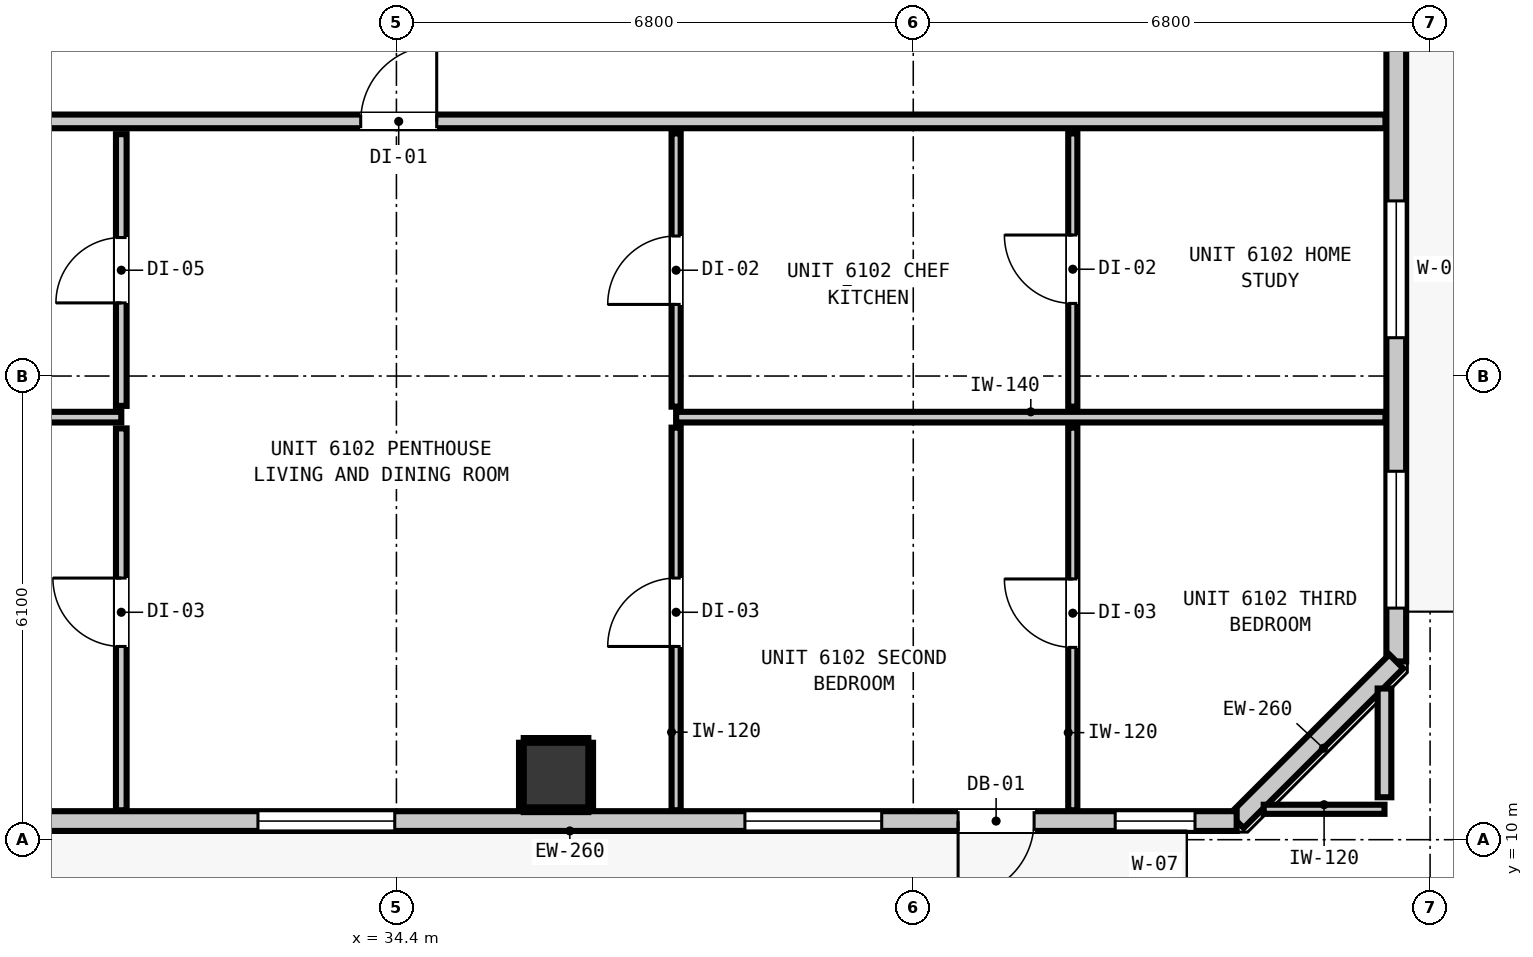
"""IFC4 building model, lengths in metres.
Left out: names, types, materials, properties, quantities, classifications, styles, units other than length and angle.
Written with IfcOpenShell. Run it as: python <this file> out.ifc"""

import sys

from ifc_helpers import new_model, si_unit, direction, frame, frame_2d, origin, origin_2d, place, context, subcontext, project, spatial, rectangle, extrude, element, fill, save


model = new_model("IFC4")
c1 = context("Model", 3, precision=1e-05, world=origin(), true_north=direction((0.0, 1.0)))
c2 = subcontext(c1, "Body", "Model", "MODEL_VIEW")
j1 = project(units=[si_unit("LENGTHUNIT", "METRE"), si_unit("PLANEANGLEUNIT", "RADIAN")], contexts=[c1])
p1 = place(None, origin())
s1 = spatial("IfcSite", under=j1, at=p1, CompositionType="ELEMENT")
p2 = place(p1, origin())
s2 = spatial("IfcBuilding", under=s1, at=p2, CompositionType="ELEMENT")
p3 = place(p2, frame((0.0, 0.0, 210.08)))
s3 = spatial("IfcBuildingStorey", under=s2, at=p3, CompositionType="ELEMENT", Elevation=210.08)
p4 = place(p3, frame((36.5, 10.85, -0.2), z_axis=(0.0, 0.0, 1.0), x_axis=(1.0, 0.0, 0.0)))
e1 = element("IfcColumn", 1, at=p4, inside=s3, PredefinedType="COLUMN", context=c2, shape_type="SweptSolid", body=[
    extrude(rectangle(XDim=0.85, YDim=0.85, at=origin_2d()), origin(), (0.0, 0.0, 1.0), 3.52),
])
p5 = place(p3, frame((47.555, 42.655, 0.0), z_axis=(0.0, 0.0, 1.0), x_axis=(0.0, -1.0, 0.0)))
e2 = element("IfcWall", 2, at=p5, inside=s3, PredefinedType="STANDARD", context=c2, shape_type="SweptSolid", body=[
    extrude(rectangle(XDim=30.31, YDim=0.26, at=frame_2d((15.155, 0.0))), origin(), (0.0, 0.0, 1.0), 3.1),
])
p6 = place(p5, frame((4.082, 0.0, 0.0)))
e3 = element("IfcOpeningElement", 3, at=p6, cuts=e2, PredefinedType="OPENING", context=c2, shape_type="SweptSolid", body=[
    extrude(rectangle(XDim=1.0, YDim=2.15, at=frame_2d((0.5, 1.075))), frame((0.0, 0.14, 0.0), z_axis=(0.0, -1.0, 0.0), x_axis=(1.0, 0.0, 0.0)), (0.0, 0.0, 1.0), 0.28),
])
p7 = place(p5, frame((24.251, 0.0, 0.85)))
e4 = element("IfcOpeningElement", 4, at=p7, cuts=e2, PredefinedType="OPENING", context=c2, shape_type="SweptSolid", body=[
    extrude(rectangle(XDim=1.8, YDim=1.9, at=frame_2d((0.9, 0.95))), frame((0.0, 0.14, 0.0), z_axis=(0.0, -1.0, 0.0), x_axis=(1.0, 0.0, 0.0)), (0.0, 0.0, 1.0), 0.28),
])
p8 = place(p5, frame((27.808, 0.0, 0.85)))
e5 = element("IfcOpeningElement", 5, at=p8, cuts=e2, PredefinedType="OPENING", context=c2, shape_type="SweptSolid", body=[
    extrude(rectangle(XDim=1.8, YDim=1.9, at=frame_2d((0.9, 0.95))), frame((0.0, 0.14, 0.0), z_axis=(0.0, -1.0, 0.0), x_axis=(1.0, 0.0, 0.0)), (0.0, 0.0, 1.0), 0.28),
])
p9 = place(p3, frame((47.555, 12.345, 0.0), z_axis=(0.0, 0.0, 1.0), x_axis=(-0.707106781187, -0.707106781187, 0.0)))
e6 = element("IfcWall", 6, at=p9, inside=s3, PredefinedType="STANDARD", context=c2, shape_type="SweptSolid", body=[
    extrude(rectangle(XDim=2.97, YDim=0.26, at=frame_2d((1.485, 0.0))), origin(), (0.0, 0.0, 1.0), 3.1),
])
p10 = place(p3, frame((45.455, 10.245, 0.0), z_axis=(0.0, 0.0, 1.0), x_axis=(-1.0, 0.0, 0.0)))
e7 = element("IfcWall", 7, at=p10, inside=s3, PredefinedType="STANDARD", context=c2, shape_type="SweptSolid", body=[
    extrude(rectangle(XDim=32.71, YDim=0.26, at=frame_2d((16.355, 0.0))), origin(), (0.0, 0.0, 1.0), 3.1),
])
p11 = place(p10, frame((2.665, 0.0, 0.0)))
e8 = element("IfcOpeningElement", 8, at=p11, cuts=e7, PredefinedType="OPENING", context=c2, shape_type="SweptSolid", body=[
    extrude(rectangle(XDim=1.0, YDim=2.15, at=frame_2d((0.5, 1.075))), frame((0.0, 0.14, 0.0), z_axis=(0.0, -1.0, 0.0), x_axis=(1.0, 0.0, 0.0)), (0.0, 0.0, 1.0), 0.28),
])
p12 = place(p10, frame((26.731, 0.0, 0.85)))
e9 = element("IfcOpeningElement", 9, at=p12, cuts=e7, PredefinedType="OPENING", context=c2, shape_type="SweptSolid", body=[
    extrude(rectangle(XDim=1.8, YDim=1.9, at=frame_2d((0.9, 0.95))), frame((0.0, 0.14, 0.0), z_axis=(0.0, -1.0, 0.0), x_axis=(1.0, 0.0, 0.0)), (0.0, 0.0, 1.0), 0.28),
])
p13 = place(p10, frame((30.556, 0.0, 0.85)))
e10 = element("IfcOpeningElement", 10, at=p13, cuts=e7, PredefinedType="OPENING", context=c2, shape_type="SweptSolid", body=[
    extrude(rectangle(XDim=0.9, YDim=1.5, at=frame_2d((0.45, 0.75))), frame((0.0, 0.14, 0.0), z_axis=(0.0, -1.0, 0.0), x_axis=(1.0, 0.0, 0.0)), (0.0, 0.0, 1.0), 0.28),
])
p14 = place(p10, frame((20.676, 0.0, 0.85)))
e11 = element("IfcOpeningElement", 11, at=p14, cuts=e7, PredefinedType="OPENING", context=c2, shape_type="SweptSolid", body=[
    extrude(rectangle(XDim=1.8, YDim=1.9, at=frame_2d((0.9, 0.95))), frame((0.0, 0.14, 0.0), z_axis=(0.0, -1.0, 0.0), x_axis=(1.0, 0.0, 0.0)), (0.0, 0.0, 1.0), 0.28),
])
p15 = place(p10, frame((11.077, 0.0, 0.85)))
e12 = element("IfcOpeningElement", 12, at=p15, cuts=e7, PredefinedType="OPENING", context=c2, shape_type="SweptSolid", body=[
    extrude(rectangle(XDim=1.8, YDim=1.9, at=frame_2d((0.9, 0.95))), frame((0.0, 0.14, 0.0), z_axis=(0.0, -1.0, 0.0), x_axis=(1.0, 0.0, 0.0)), (0.0, 0.0, 1.0), 0.28),
])
p16 = place(p10, frame((17.428, 0.0, 0.85)))
e13 = element("IfcOpeningElement", 13, at=p16, cuts=e7, PredefinedType="OPENING", context=c2, shape_type="SweptSolid", body=[
    extrude(rectangle(XDim=1.8, YDim=1.9, at=frame_2d((0.9, 0.95))), frame((0.0, 0.14, 0.0), z_axis=(0.0, -1.0, 0.0), x_axis=(1.0, 0.0, 0.0)), (0.0, 0.0, 1.0), 0.28),
])
p17 = place(p10, frame((4.67, 0.0, 0.85)))
e14 = element("IfcOpeningElement", 14, at=p17, cuts=e7, PredefinedType="OPENING", context=c2, shape_type="SweptSolid", body=[
    extrude(rectangle(XDim=1.8, YDim=1.9, at=frame_2d((0.9, 0.95))), frame((0.0, 0.14, 0.0), z_axis=(0.0, -1.0, 0.0), x_axis=(1.0, 0.0, 0.0)), (0.0, 0.0, 1.0), 0.28),
])
p18 = place(p10, frame((0.548, 0.0, 0.85)))
e15 = element("IfcOpeningElement", 15, at=p18, cuts=e7, PredefinedType="OPENING", context=c2, shape_type="SweptSolid", body=[
    extrude(rectangle(XDim=1.05, YDim=1.65, at=frame_2d((0.525, 0.825))), frame((0.0, 0.14, 0.0), z_axis=(0.0, -1.0, 0.0), x_axis=(1.0, 0.0, 0.0)), (0.0, 0.0, 1.0), 0.28),
])
p19 = place(p3, frame((10.787, 19.45, 0.0), z_axis=(0.0, 0.0, 1.0), x_axis=(1.0, 0.0, 0.0)))
e16 = element("IfcWall", 16, at=p19, inside=s3, PredefinedType="PARTITIONING", context=c2, shape_type="SweptSolid", body=[
    extrude(rectangle(XDim=36.626, YDim=0.18, at=frame_2d((18.313, 0.0))), origin(), (0.0, 0.0, 1.0), 3.1),
])
p20 = place(p19, frame((7.49, 0.0, 0.0)))
e17 = element("IfcOpeningElement", 17, at=p20, cuts=e16, PredefinedType="OPENING", context=c2, shape_type="SweptSolid", body=[
    extrude(rectangle(XDim=1.0, YDim=2.15, at=frame_2d((0.5, 1.075))), frame((0.0, 0.1, 0.0), z_axis=(0.0, -1.0, 0.0), x_axis=(1.0, 0.0, 0.0)), (0.0, 0.0, 1.0), 0.2),
])
p21 = place(p19, frame((23.143, 0.0, 0.0)))
e18 = element("IfcOpeningElement", 18, at=p21, cuts=e16, PredefinedType="OPENING", context=c2, shape_type="SweptSolid", body=[
    extrude(rectangle(XDim=1.0, YDim=2.15, at=frame_2d((0.5, 1.075))), frame((0.0, 0.1, 0.0), z_axis=(0.0, -1.0, 0.0), x_axis=(1.0, 0.0, 0.0)), (0.0, 0.0, 1.0), 0.2),
])
p22 = place(p3, frame((22.38, 15.559, 0.0), z_axis=(0.0, 0.0, 1.0), x_axis=(1.0, 0.0, 0.0)))
e19 = element("IfcWall", 19, at=p22, inside=s3, PredefinedType="PARTITIONING", context=c2, shape_type="SweptSolid", body=[
    extrude(rectangle(XDim=8.4, YDim=0.14, at=frame_2d((4.2, 0.0))), origin(), (0.0, 0.0, 1.0), 3.1),
])
p23 = place(p3, frame((38.08, 15.559, 0.0), z_axis=(0.0, 0.0, 1.0), x_axis=(1.0, 0.0, 0.0)))
e20 = element("IfcWall", 20, at=p23, inside=s3, PredefinedType="PARTITIONING", context=c2, shape_type="SweptSolid", body=[
    extrude(rectangle(XDim=9.333, YDim=0.14, at=frame_2d((4.667, 0.0))), origin(), (0.0, 0.0, 1.0), 3.1),
])
p24 = place(p3, frame((45.811, 10.4, 0.0), z_axis=(0.0, 0.0, 1.0), x_axis=(1.0, 0.0, 0.0)))
e21 = element("IfcWall", 21, at=p24, inside=s3, PredefinedType="PARTITIONING", context=c2, shape_type="SweptSolid", body=[
    extrude(rectangle(XDim=1.589, YDim=0.12, at=frame_2d((0.794, 0.0))), origin(), (0.0, 0.0, 1.0), 3.1),
])
p25 = place(p3, frame((47.4, 10.558, 0.0), z_axis=(0.0, 0.0, 1.0), x_axis=(0.0, 1.0, 0.0)))
e22 = element("IfcWall", 22, at=p25, inside=s3, PredefinedType="PARTITIONING", context=c2, shape_type="SweptSolid", body=[
    extrude(rectangle(XDim=1.431, YDim=0.18, at=frame_2d((0.715, 0.0))), origin(), (0.0, 0.0, 1.0), 3.1),
])
p26 = place(p3, frame((30.78, 10.387, 0.0), z_axis=(0.0, 0.0, 1.0), x_axis=(0.0, 1.0, 0.0)))
e23 = element("IfcWall", 23, at=p26, inside=s3, PredefinedType="PARTITIONING", context=c2, shape_type="SweptSolid", body=[
    extrude(rectangle(XDim=5.024, YDim=0.14, at=frame_2d((2.512, 0.0))), origin(), (0.0, 0.0, 1.0), 3.1),
])
p27 = place(p26, frame((2.155, 0.0, 0.0)))
e24 = element("IfcOpeningElement", 24, at=p27, cuts=e23, PredefinedType="OPENING", context=c2, shape_type="SweptSolid", body=[
    extrude(rectangle(XDim=0.9, YDim=2.1, at=frame_2d((0.45, 1.05))), frame((0.0, 0.08, 0.0), z_axis=(0.0, -1.0, 0.0), x_axis=(1.0, 0.0, 0.0)), (0.0, 0.0, 1.0), 0.16),
])
p28 = place(p3, frame((30.78, 15.707, 0.0), z_axis=(0.0, 0.0, 1.0), x_axis=(0.0, 1.0, 0.0)))
e25 = element("IfcWall", 25, at=p28, inside=s3, PredefinedType="PARTITIONING", context=c2, shape_type="SweptSolid", body=[
    extrude(rectangle(XDim=3.575, YDim=0.14, at=frame_2d((1.788, 0.0))), origin(), (0.0, 0.0, 1.0), 3.1),
])
p29 = place(p28, frame((1.355, 0.0, 0.0)))
e26 = element("IfcOpeningElement", 26, at=p29, cuts=e25, PredefinedType="OPENING", context=c2, shape_type="SweptSolid", body=[
    extrude(rectangle(XDim=0.86, YDim=2.02, at=frame_2d((0.43, 1.01))), frame((0.0, 0.08, 0.0), z_axis=(0.0, -1.0, 0.0), x_axis=(1.0, 0.0, 0.0)), (0.0, 0.0, 1.0), 0.16),
])
p30 = place(p3, frame((38.08, 10.387, 0.0), z_axis=(0.0, 0.0, 1.0), x_axis=(0.0, 1.0, 0.0)))
e27 = element("IfcWall", 27, at=p30, inside=s3, PredefinedType="PARTITIONING", context=c2, shape_type="SweptSolid", body=[
    extrude(rectangle(XDim=5.034, YDim=0.12, at=frame_2d((2.517, 0.0))), origin(), (0.0, 0.0, 1.0), 3.1),
])
p31 = place(p30, frame((2.155, 0.0, 0.0)))
e28 = element("IfcOpeningElement", 28, at=p31, cuts=e27, PredefinedType="OPENING", context=c2, shape_type="SweptSolid", body=[
    extrude(rectangle(XDim=0.9, YDim=2.1, at=frame_2d((0.45, 1.05))), frame((0.0, 0.07, 0.0), z_axis=(0.0, -1.0, 0.0), x_axis=(1.0, 0.0, 0.0)), (0.0, 0.0, 1.0), 0.14),
])
p32 = place(p3, frame((38.08, 15.697, 0.0), z_axis=(0.0, 0.0, 1.0), x_axis=(0.0, 1.0, 0.0)))
e29 = element("IfcWall", 29, at=p32, inside=s3, PredefinedType="PARTITIONING", context=c2, shape_type="SweptSolid", body=[
    extrude(rectangle(XDim=3.595, YDim=0.12, at=frame_2d((1.797, 0.0))), origin(), (0.0, 0.0, 1.0), 3.1),
])
p33 = place(p32, frame((1.345, 0.0, 0.0)))
e30 = element("IfcOpeningElement", 30, at=p33, cuts=e29, PredefinedType="OPENING", context=c2, shape_type="SweptSolid", body=[
    extrude(rectangle(XDim=0.9, YDim=2.1, at=frame_2d((0.45, 1.05))), frame((0.0, 0.07, 0.0), z_axis=(0.0, -1.0, 0.0), x_axis=(1.0, 0.0, 0.0)), (0.0, 0.0, 1.0), 0.14),
])
p34 = place(p3, frame((43.299, 10.387, 0.0), z_axis=(0.0, 0.0, 1.0), x_axis=(0.0, 1.0, 0.0)))
e31 = element("IfcWall", 31, at=p34, inside=s3, PredefinedType="PARTITIONING", context=c2, shape_type="SweptSolid", body=[
    extrude(rectangle(XDim=5.034, YDim=0.12, at=frame_2d((2.517, 0.0))), origin(), (0.0, 0.0, 1.0), 3.1),
])
p35 = place(p34, frame((2.143, 0.0, 0.0)))
e32 = element("IfcOpeningElement", 32, at=p35, cuts=e31, PredefinedType="OPENING", context=c2, shape_type="SweptSolid", body=[
    extrude(rectangle(XDim=0.9, YDim=2.1, at=frame_2d((0.45, 1.05))), frame((0.0, 0.07, 0.0), z_axis=(0.0, -1.0, 0.0), x_axis=(1.0, 0.0, 0.0)), (0.0, 0.0, 1.0), 0.14),
])
p36 = place(p3, frame((43.299, 15.697, 0.0), z_axis=(0.0, 0.0, 1.0), x_axis=(0.0, 1.0, 0.0)))
e33 = element("IfcWall", 33, at=p36, inside=s3, PredefinedType="PARTITIONING", context=c2, shape_type="SweptSolid", body=[
    extrude(rectangle(XDim=3.595, YDim=0.12, at=frame_2d((1.797, 0.0))), origin(), (0.0, 0.0, 1.0), 3.1),
])
p37 = place(p36, frame((1.358, 0.0, 0.0)))
e34 = element("IfcOpeningElement", 34, at=p37, cuts=e33, PredefinedType="OPENING", context=c2, shape_type="SweptSolid", body=[
    extrude(rectangle(XDim=0.9, YDim=2.1, at=frame_2d((0.45, 1.05))), frame((0.0, 0.07, 0.0), z_axis=(0.0, -1.0, 0.0), x_axis=(1.0, 0.0, 0.0)), (0.0, 0.0, 1.0), 0.14),
])
for number, where, z_axis, x_axis in (
    (35, (36.075, 10.393, 0.0), (0.0, 0.0, 1.0), (1.0, 0.0, 0.0)),
    (36, (36.075, 11.307, 0.0), (0.0, 0.0, 1.0), (1.0, 0.0, 0.0)),
):
    element("IfcWall", number, at=place(p3, frame(where, z_axis=z_axis, x_axis=x_axis)), inside=s3, PredefinedType="PARTITIONING", context=c2, shape_type="SweptSolid", body=[
        extrude(rectangle(XDim=0.85, YDim=0.06, at=frame_2d((0.425, 0.0))), origin(), (0.0, 0.0, 1.0), 1.45),
    ])
for number, where, z_axis, x_axis in (
    (37, (36.043, 10.425, 0.0), (0.0, 0.0, 1.0), (0.0, 1.0, 0.0)),
    (38, (36.957, 10.425, 0.0), (0.0, 0.0, 1.0), (0.0, 1.0, 0.0)),
):
    element("IfcWall", number, at=place(p3, frame(where, z_axis=z_axis, x_axis=x_axis)), inside=s3, PredefinedType="PARTITIONING", context=c2, shape_type="SweptSolid", body=[
        extrude(rectangle(XDim=0.85, YDim=0.06, at=frame_2d((0.425, 0.0))), origin(), (0.0, 0.0, 1.0), 1.45),
    ])
p38 = place(p11, origin())
e39 = element("IfcDoor", 39, at=p38, inside=s3, OperationType="SINGLE_SWING_RIGHT", PredefinedType="DOOR", context=c2, shape_type="SweptSolid", body=[
    extrude(rectangle(XDim=1.0, YDim=2.15, at=frame_2d((0.5, 1.075))), frame((0.0, 0.025, 0.0), z_axis=(0.0, -1.0, 0.0), x_axis=(1.0, 0.0, 0.0)), (0.0, 0.0, 1.0), 0.05),
])
fill(e8, e39)
p39 = place(p7, origin())
e40 = element("IfcWindow", 40, at=p39, inside=s3, PartitioningType="SINGLE_PANEL", PredefinedType="WINDOW", context=c2, shape_type="SweptSolid", body=[
    extrude(rectangle(XDim=1.8, YDim=1.9, at=frame_2d((0.9, 0.95))), frame((0.0, 0.03, 0.0), z_axis=(0.0, -1.0, 0.0), x_axis=(1.0, 0.0, 0.0)), (0.0, 0.0, 1.0), 0.06),
])
fill(e4, e40)
p40 = place(p8, origin())
e41 = element("IfcWindow", 41, at=p40, inside=s3, PartitioningType="SINGLE_PANEL", PredefinedType="WINDOW", context=c2, shape_type="SweptSolid", body=[
    extrude(rectangle(XDim=1.8, YDim=1.9, at=frame_2d((0.9, 0.95))), frame((0.0, 0.03, 0.0), z_axis=(0.0, -1.0, 0.0), x_axis=(1.0, 0.0, 0.0)), (0.0, 0.0, 1.0), 0.06),
])
fill(e5, e41)
p41 = place(p15, origin())
e42 = element("IfcWindow", 42, at=p41, inside=s3, PartitioningType="SINGLE_PANEL", PredefinedType="WINDOW", context=c2, shape_type="SweptSolid", body=[
    extrude(rectangle(XDim=1.8, YDim=1.9, at=frame_2d((0.9, 0.95))), frame((0.0, 0.03, 0.0), z_axis=(0.0, -1.0, 0.0), x_axis=(1.0, 0.0, 0.0)), (0.0, 0.0, 1.0), 0.06),
])
fill(e12, e42)
p42 = place(p17, origin())
e43 = element("IfcWindow", 43, at=p42, inside=s3, PartitioningType="SINGLE_PANEL", PredefinedType="WINDOW", context=c2, shape_type="SweptSolid", body=[
    extrude(rectangle(XDim=1.8, YDim=1.9, at=frame_2d((0.9, 0.95))), frame((0.0, 0.03, 0.0), z_axis=(0.0, -1.0, 0.0), x_axis=(1.0, 0.0, 0.0)), (0.0, 0.0, 1.0), 0.06),
])
fill(e14, e43)
p43 = place(p18, origin())
e44 = element("IfcWindow", 44, at=p43, inside=s3, PartitioningType="SINGLE_PANEL", PredefinedType="WINDOW", context=c2, shape_type="SweptSolid", body=[
    extrude(rectangle(XDim=1.05, YDim=1.65, at=frame_2d((0.525, 0.825))), frame((0.0, 0.03, 0.0), z_axis=(0.0, -1.0, 0.0), x_axis=(1.0, 0.0, 0.0)), (0.0, 0.0, 1.0), 0.06),
])
fill(e15, e44)
p44 = place(p21, origin())
e45 = element("IfcDoor", 45, at=p44, inside=s3, OperationType="SINGLE_SWING_RIGHT", PredefinedType="DOOR", context=c2, shape_type="SweptSolid", body=[
    extrude(rectangle(XDim=1.0, YDim=2.15, at=frame_2d((0.5, 1.075))), frame((0.0, 0.025, 0.0), z_axis=(0.0, -1.0, 0.0), x_axis=(1.0, 0.0, 0.0)), (0.0, 0.0, 1.0), 0.05),
])
fill(e18, e45)
p45 = place(p29, origin())
e46 = element("IfcDoor", 46, at=p45, inside=s3, OperationType="SINGLE_SWING_LEFT", PredefinedType="DOOR", context=c2, shape_type="SweptSolid", body=[
    extrude(rectangle(XDim=0.86, YDim=2.02, at=frame_2d((0.43, 1.01))), frame((0.0, 0.025, 0.0), z_axis=(0.0, -1.0, 0.0), x_axis=(1.0, 0.0, 0.0)), (0.0, 0.0, 1.0), 0.05),
])
fill(e26, e46)
p46 = place(p27, origin())
e47 = element("IfcDoor", 47, at=p46, inside=s3, OperationType="SINGLE_SWING_RIGHT", PredefinedType="DOOR", context=c2, shape_type="SweptSolid", body=[
    extrude(rectangle(XDim=0.9, YDim=2.1, at=frame_2d((0.45, 1.05))), frame((0.0, 0.025, 0.0), z_axis=(0.0, -1.0, 0.0), x_axis=(1.0, 0.0, 0.0)), (0.0, 0.0, 1.0), 0.05),
])
fill(e24, e47)
p47 = place(p33, origin())
e48 = element("IfcDoor", 48, at=p47, inside=s3, OperationType="SINGLE_SWING_LEFT", PredefinedType="DOOR", context=c2, shape_type="SweptSolid", body=[
    extrude(rectangle(XDim=0.9, YDim=2.1, at=frame_2d((0.45, 1.05))), frame((0.0, 0.025, 0.0), z_axis=(0.0, -1.0, 0.0), x_axis=(1.0, 0.0, 0.0)), (0.0, 0.0, 1.0), 0.05),
])
fill(e30, e48)
p48 = place(p37, origin())
e49 = element("IfcDoor", 49, at=p48, inside=s3, OperationType="SINGLE_SWING_RIGHT", PredefinedType="DOOR", context=c2, shape_type="SweptSolid", body=[
    extrude(rectangle(XDim=0.9, YDim=2.1, at=frame_2d((0.45, 1.05))), frame((0.0, 0.025, 0.0), z_axis=(0.0, -1.0, 0.0), x_axis=(1.0, 0.0, 0.0)), (0.0, 0.0, 1.0), 0.05),
])
fill(e34, e49)
p49 = place(p31, origin())
e50 = element("IfcDoor", 50, at=p49, inside=s3, OperationType="SINGLE_SWING_LEFT", PredefinedType="DOOR", context=c2, shape_type="SweptSolid", body=[
    extrude(rectangle(XDim=0.9, YDim=2.1, at=frame_2d((0.45, 1.05))), frame((0.0, 0.025, 0.0), z_axis=(0.0, -1.0, 0.0), x_axis=(1.0, 0.0, 0.0)), (0.0, 0.0, 1.0), 0.05),
])
fill(e28, e50)
p50 = place(p35, origin())
e51 = element("IfcDoor", 51, at=p50, inside=s3, OperationType="SINGLE_SWING_RIGHT", PredefinedType="DOOR", context=c2, shape_type="SweptSolid", body=[
    extrude(rectangle(XDim=0.9, YDim=2.1, at=frame_2d((0.45, 1.05))), frame((0.0, 0.025, 0.0), z_axis=(0.0, -1.0, 0.0), x_axis=(1.0, 0.0, 0.0)), (0.0, 0.0, 1.0), 0.05),
])
fill(e32, e51)
save(model, sys.argv[1])
